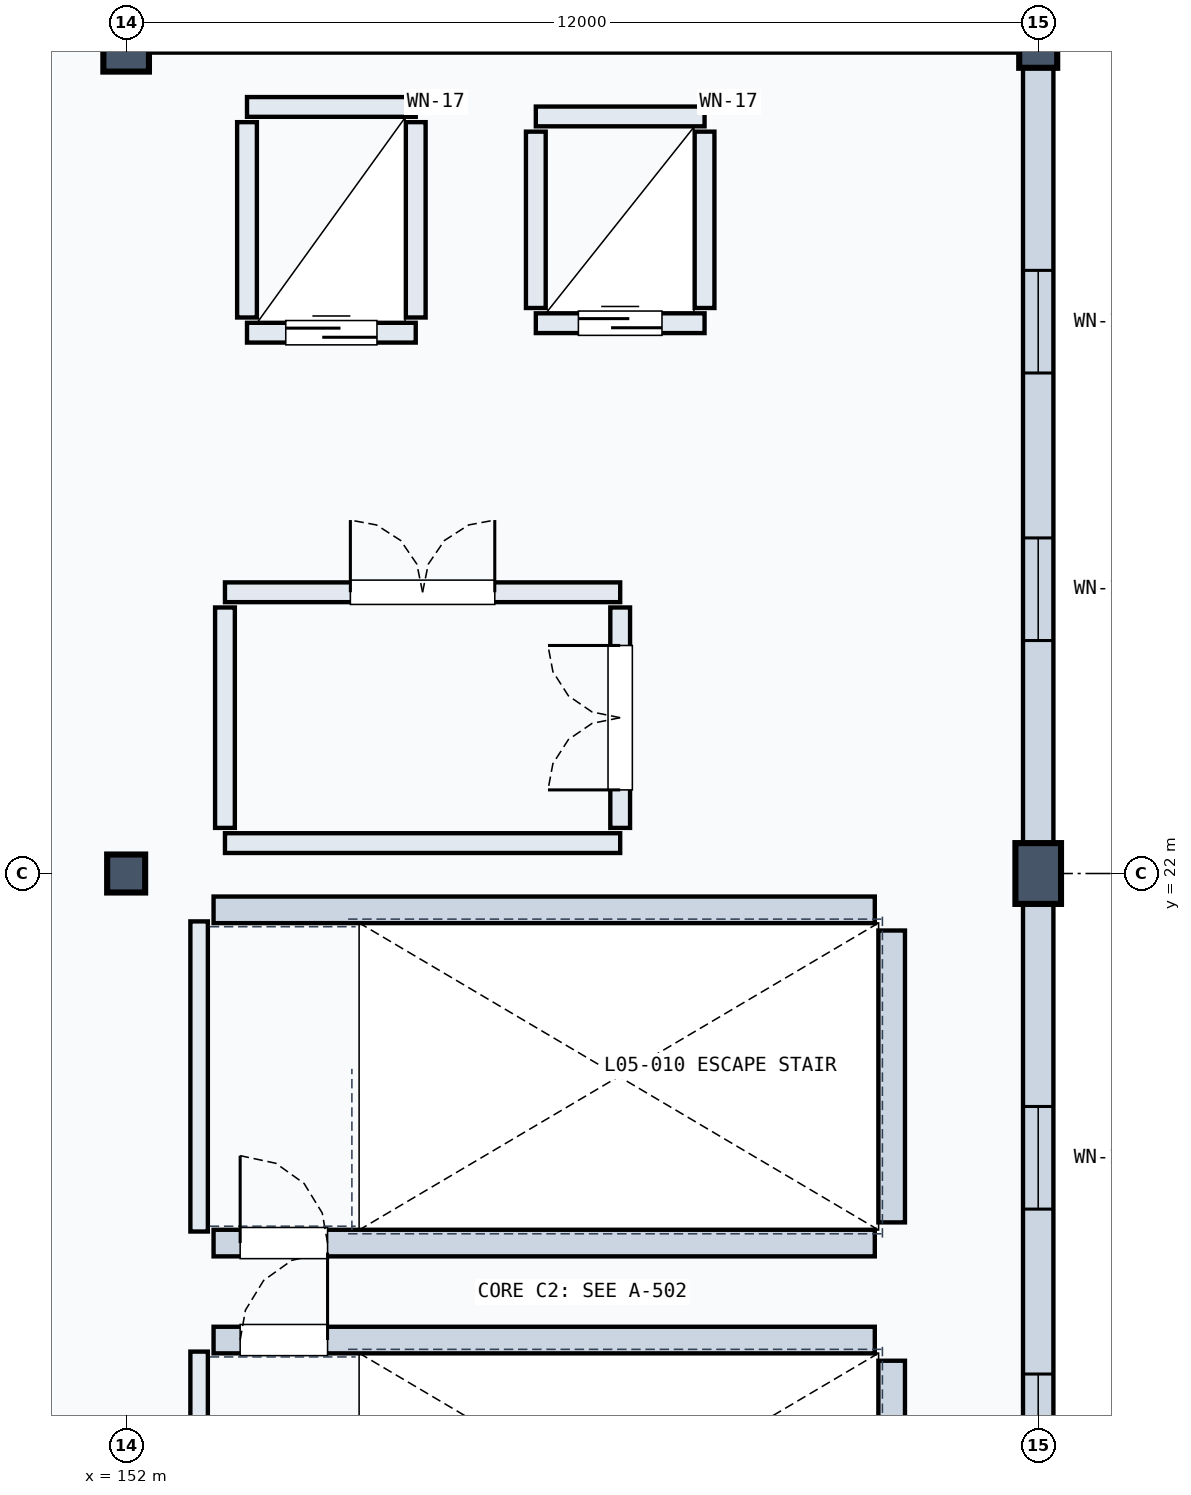
"""IFC4 building model, lengths in metres.
Left out: names, types, materials, properties, quantities, classifications, styles, units other than length and angle.
Written with IfcOpenShell. Run it as: python <this file> out.ifc"""

import sys

from ifc_helpers import new_model, si_unit, direction, frame, frame_2d, origin, origin_2d, place, context, subcontext, project, spatial, rectangle, extrude, element, fill, save


model = new_model("IFC4")
c1 = context("Model", 3, precision=1e-05, world=origin(), true_north=direction((0.0, 1.0)))
c2 = subcontext(c1, "Body", "Model", "MODEL_VIEW")
j1 = project(units=[si_unit("LENGTHUNIT", "METRE"), si_unit("PLANEANGLEUNIT", "RADIAN")], contexts=[c1])
p1 = place(None, origin())
s1 = spatial("IfcSite", under=j1, at=p1, CompositionType="ELEMENT")
p2 = place(p1, origin())
s2 = spatial("IfcBuilding", under=s1, at=p2, CompositionType="ELEMENT")
p3 = place(p2, frame((0.0, 0.0, 24.3)))
s3 = spatial("IfcBuildingStorey", under=s2, at=p3, CompositionType="ELEMENT", Elevation=24.3)
p4 = place(p3, frame((152.0, 22.0, 0.0), z_axis=(0.0, 0.0, 1.0), x_axis=(1.0, 0.0, 0.0)))
e1 = element("IfcColumn", 1, at=p4, inside=s3, PredefinedType="COLUMN", context=c2, shape_type="SweptSolid", body=[
    extrude(rectangle(XDim=0.5, YDim=0.5, at=origin_2d()), origin(), (0.0, 0.0, 1.0), 5.4),
])
p5 = place(p3, frame((152.0, 33.0, 0.0), z_axis=(0.0, 0.0, 1.0), x_axis=(1.0, 0.0, 0.0)))
e2 = element("IfcColumn", 2, at=p5, inside=s3, PredefinedType="COLUMN", context=c2, shape_type="SweptSolid", body=[
    extrude(rectangle(XDim=0.6, YDim=0.9, at=origin_2d()), origin(), (0.0, 0.0, 1.0), 5.4),
])
p6 = place(p3, frame((164.0, 22.0, 0.0), z_axis=(0.0, 0.0, 1.0), x_axis=(1.0, 0.0, 0.0)))
e3 = element("IfcColumn", 3, at=p6, inside=s3, PredefinedType="COLUMN", context=c2, shape_type="SweptSolid", body=[
    extrude(rectangle(XDim=0.6, YDim=0.8, at=origin_2d()), origin(), (0.0, 0.0, 1.0), 5.4),
])
p7 = place(p3, frame((164.0, 33.0, 0.0), z_axis=(0.0, 0.0, 1.0), x_axis=(1.0, 0.0, 0.0)))
e4 = element("IfcColumn", 4, at=p7, inside=s3, PredefinedType="COLUMN", context=c2, shape_type="SweptSolid", body=[
    extrude(rectangle(XDim=0.5, YDim=0.8, at=origin_2d()), origin(), (0.0, 0.0, 1.0), 5.4),
])
p8 = place(p3, frame((164.0, 11.22, 0.0), z_axis=(0.0, 0.0, 1.0), x_axis=(0.0, 1.0, 0.0)))
e5 = element("IfcWall", 5, at=p8, inside=s3, PredefinedType="SOLIDWALL", context=c2, shape_type="SweptSolid", body=[
    extrude(rectangle(XDim=10.56, YDim=0.4, at=frame_2d((5.28, 0.0))), origin(), (0.0, 0.0, 1.0), 5.185),
])
p9 = place(p8, frame((2.845, 0.0, 0.8)))
e6 = element("IfcOpeningElement", 6, at=p9, cuts=e5, PredefinedType="OPENING", context=c2, shape_type="SweptSolid", body=[
    extrude(rectangle(XDim=1.35, YDim=2.1, at=frame_2d((0.675, 1.05))), frame((0.0, 0.21, 0.0), z_axis=(0.0, -1.0, 0.0), x_axis=(1.0, 0.0, 0.0)), (0.0, 0.0, 1.0), 0.42),
])
p10 = place(p8, frame((6.365, 0.0, 0.8)))
e7 = element("IfcOpeningElement", 7, at=p10, cuts=e5, PredefinedType="OPENING", context=c2, shape_type="SweptSolid", body=[
    extrude(rectangle(XDim=1.35, YDim=2.1, at=frame_2d((0.675, 1.05))), frame((0.0, 0.21, 0.0), z_axis=(0.0, -1.0, 0.0), x_axis=(1.0, 0.0, 0.0)), (0.0, 0.0, 1.0), 0.42),
])
p11 = place(p3, frame((152.22, 33.0, 0.0), z_axis=(0.0, 0.0, 1.0), x_axis=(1.0, 0.0, 0.0)))
e8 = element("IfcWall", 8, at=p11, inside=s3, PredefinedType="SOLIDWALL", context=c2, shape_type="SweptSolid", body=[
    extrude(rectangle(XDim=11.56, YDim=0.4, at=frame_2d((5.78, 0.0))), origin(), (0.0, 0.0, 1.0), 5.185),
])
p12 = place(p11, frame((3.178, 0.0, 0.8)))
e9 = element("IfcOpeningElement", 9, at=p12, cuts=e8, PredefinedType="OPENING", context=c2, shape_type="SweptSolid", body=[
    extrude(rectangle(XDim=1.35, YDim=2.1, at=frame_2d((0.675, 1.05))), frame((0.0, 0.21, 0.0), z_axis=(0.0, -1.0, 0.0), x_axis=(1.0, 0.0, 0.0)), (0.0, 0.0, 1.0), 0.42),
])
p13 = place(p11, frame((7.032, 0.0, 0.8)))
e10 = element("IfcOpeningElement", 10, at=p13, cuts=e8, PredefinedType="OPENING", context=c2, shape_type="SweptSolid", body=[
    extrude(rectangle(XDim=1.35, YDim=2.1, at=frame_2d((0.675, 1.05))), frame((0.0, 0.21, 0.0), z_axis=(0.0, -1.0, 0.0), x_axis=(1.0, 0.0, 0.0)), (0.0, 0.0, 1.0), 0.42),
])
p14 = place(p3, frame((164.0, 22.22, 0.0), z_axis=(0.0, 0.0, 1.0), x_axis=(0.0, 1.0, 0.0)))
e11 = element("IfcWall", 11, at=p14, inside=s3, PredefinedType="SOLIDWALL", context=c2, shape_type="SweptSolid", body=[
    extrude(rectangle(XDim=10.56, YDim=0.4, at=frame_2d((5.28, 0.0))), origin(), (0.0, 0.0, 1.0), 5.185),
])
p15 = place(p14, frame((2.845, 0.0, 0.8)))
e12 = element("IfcOpeningElement", 12, at=p15, cuts=e11, PredefinedType="OPENING", context=c2, shape_type="SweptSolid", body=[
    extrude(rectangle(XDim=1.35, YDim=2.1, at=frame_2d((0.675, 1.05))), frame((0.0, 0.21, 0.0), z_axis=(0.0, -1.0, 0.0), x_axis=(1.0, 0.0, 0.0)), (0.0, 0.0, 1.0), 0.42),
])
p16 = place(p14, frame((6.365, 0.0, 0.8)))
e13 = element("IfcOpeningElement", 13, at=p16, cuts=e11, PredefinedType="OPENING", context=c2, shape_type="SweptSolid", body=[
    extrude(rectangle(XDim=1.35, YDim=2.1, at=frame_2d((0.675, 1.05))), frame((0.0, 0.21, 0.0), z_axis=(0.0, -1.0, 0.0), x_axis=(1.0, 0.0, 0.0)), (0.0, 0.0, 1.0), 0.42),
])
p17 = place(p3, frame((152.96, 11.63, 0.0), z_axis=(0.0, 0.0, 1.0), x_axis=(0.0, 1.0, 0.0)))
e14 = element("IfcWall", 14, at=p17, inside=s3, PredefinedType="SOLIDWALL", context=c2, shape_type="SweptSolid", body=[
    extrude(rectangle(XDim=4.08, YDim=0.23, at=frame_2d((2.04, 0.0))), origin(), (0.0, 0.0, 1.0), 5.18),
])
p18 = place(p3, frame((162.072, 11.05, 0.0), z_axis=(0.0, 0.0, 1.0), x_axis=(0.0, 1.0, 0.0)))
e15 = element("IfcWall", 15, at=p18, inside=s3, PredefinedType="SOLIDWALL", context=c2, shape_type="SweptSolid", body=[
    extrude(rectangle(XDim=4.54, YDim=0.35, at=frame_2d((2.27, 0.0))), origin(), (0.0, 0.0, 1.0), 5.18),
])
p19 = place(p3, frame((153.15, 15.862, 0.0), z_axis=(0.0, 0.0, 1.0), x_axis=(1.0, 0.0, 0.0)))
e16 = element("IfcWall", 16, at=p19, inside=s3, PredefinedType="SOLIDWALL", context=c2, shape_type="SweptSolid", body=[
    extrude(rectangle(XDim=8.7, YDim=0.35, at=frame_2d((4.35, 0.0))), origin(), (0.0, 0.0, 1.0), 5.18),
])
p20 = place(p19, frame((0.35, 0.0, 0.0)))
e17 = element("IfcOpeningElement", 17, at=p20, cuts=e16, PredefinedType="OPENING", context=c2, shape_type="SweptSolid", body=[
    extrude(rectangle(XDim=1.15, YDim=2.2, at=frame_2d((0.575, 1.1))), frame((0.0, 0.185, 0.0), z_axis=(0.0, -1.0, 0.0), x_axis=(1.0, 0.0, 0.0)), (0.0, 0.0, 1.0), 0.37),
])
p21 = place(p3, frame((152.96, 17.29, 0.0), z_axis=(0.0, 0.0, 1.0), x_axis=(0.0, 1.0, 0.0)))
e18 = element("IfcWall", 18, at=p21, inside=s3, PredefinedType="SOLIDWALL", context=c2, shape_type="SweptSolid", body=[
    extrude(rectangle(XDim=4.08, YDim=0.23, at=frame_2d((2.04, 0.0))), origin(), (0.0, 0.0, 1.0), 5.18),
])
p22 = place(p3, frame((162.072, 17.41, 0.0), z_axis=(0.0, 0.0, 1.0), x_axis=(0.0, 1.0, 0.0)))
e19 = element("IfcWall", 19, at=p22, inside=s3, PredefinedType="SOLIDWALL", context=c2, shape_type="SweptSolid", body=[
    extrude(rectangle(XDim=3.84, YDim=0.35, at=frame_2d((1.92, 0.0))), origin(), (0.0, 0.0, 1.0), 5.18),
])
p23 = place(p3, frame((153.15, 17.138, 0.0), z_axis=(0.0, 0.0, 1.0), x_axis=(1.0, 0.0, 0.0)))
e20 = element("IfcWall", 20, at=p23, inside=s3, PredefinedType="SOLIDWALL", context=c2, shape_type="SweptSolid", body=[
    extrude(rectangle(XDim=8.7, YDim=0.35, at=frame_2d((4.35, 0.0))), origin(), (0.0, 0.0, 1.0), 5.18),
])
p24 = place(p23, frame((0.35, 0.0, 0.0)))
e21 = element("IfcOpeningElement", 21, at=p24, cuts=e20, PredefinedType="OPENING", context=c2, shape_type="SweptSolid", body=[
    extrude(rectangle(XDim=1.15, YDim=2.2, at=frame_2d((0.575, 1.1))), frame((0.0, 0.185, 0.0), z_axis=(0.0, -1.0, 0.0), x_axis=(1.0, 0.0, 0.0)), (0.0, 0.0, 1.0), 0.37),
])
p25 = place(p3, frame((153.15, 21.522, 0.0), z_axis=(0.0, 0.0, 1.0), x_axis=(1.0, 0.0, 0.0)))
e22 = element("IfcWall", 22, at=p25, inside=s3, PredefinedType="SOLIDWALL", context=c2, shape_type="SweptSolid", body=[
    extrude(rectangle(XDim=8.7, YDim=0.35, at=frame_2d((4.35, 0.0))), origin(), (0.0, 0.0, 1.0), 5.18),
])
p26 = place(p3, frame((153.59, 29.115, 0.0), z_axis=(0.0, 0.0, 1.0), x_axis=(1.0, 0.0, 0.0)))
e23 = element("IfcWall", 23, at=p26, inside=s3, PredefinedType="SOLIDWALL", context=c2, shape_type="SweptSolid", body=[
    extrude(rectangle(XDim=2.22, YDim=0.26, at=frame_2d((1.11, 0.0))), origin(), (0.0, 0.0, 1.0), 5.18),
])
p27 = place(p26, frame((0.51, 0.0, 0.0)))
e24 = element("IfcOpeningElement", 24, at=p27, cuts=e23, PredefinedType="OPENING", context=c2, shape_type="SweptSolid", body=[
    extrude(rectangle(XDim=1.2, YDim=2.2, at=frame_2d((0.6, 1.1))), frame((0.0, 0.14, 0.0), z_axis=(0.0, -1.0, 0.0), x_axis=(1.0, 0.0, 0.0)), (0.0, 0.0, 1.0), 0.28),
])
p28 = place(p3, frame((153.59, 32.085, 0.0), z_axis=(0.0, 0.0, 1.0), x_axis=(1.0, 0.0, 0.0)))
e25 = element("IfcWall", 25, at=p28, inside=s3, PredefinedType="SOLIDWALL", context=c2, shape_type="SweptSolid", body=[
    extrude(rectangle(XDim=2.22, YDim=0.26, at=frame_2d((1.11, 0.0))), origin(), (0.0, 0.0, 1.0), 5.18),
])
for number, where, z_axis, x_axis in (
    (26, (153.59, 29.315, 0.0), (0.0, 0.0, 1.0), (0.0, 1.0, 0.0)),
    (27, (155.81, 29.315, 0.0), (0.0, 0.0, 1.0), (0.0, 1.0, 0.0)),
):
    element("IfcWall", number, at=place(p3, frame(where, z_axis=z_axis, x_axis=x_axis)), inside=s3, PredefinedType="SOLIDWALL", context=c2, shape_type="SweptSolid", body=[
        extrude(rectangle(XDim=2.57, YDim=0.26, at=frame_2d((1.285, 0.0))), origin(), (0.0, 0.0, 1.0), 5.18),
    ])
p29 = place(p3, frame((157.39, 29.24, 0.0), z_axis=(0.0, 0.0, 1.0), x_axis=(1.0, 0.0, 0.0)))
e28 = element("IfcWall", 28, at=p29, inside=s3, PredefinedType="SOLIDWALL", context=c2, shape_type="SweptSolid", body=[
    extrude(rectangle(XDim=2.22, YDim=0.26, at=frame_2d((1.11, 0.0))), origin(), (0.0, 0.0, 1.0), 5.18),
])
p30 = place(p29, frame((0.56, 0.0, 0.0)))
e29 = element("IfcOpeningElement", 29, at=p30, cuts=e28, PredefinedType="OPENING", context=c2, shape_type="SweptSolid", body=[
    extrude(rectangle(XDim=1.1, YDim=2.15, at=frame_2d((0.55, 1.075))), frame((0.0, 0.14, 0.0), z_axis=(0.0, -1.0, 0.0), x_axis=(1.0, 0.0, 0.0)), (0.0, 0.0, 1.0), 0.28),
])
p31 = place(p3, frame((157.39, 31.96, 0.0), z_axis=(0.0, 0.0, 1.0), x_axis=(1.0, 0.0, 0.0)))
e30 = element("IfcWall", 30, at=p31, inside=s3, PredefinedType="SOLIDWALL", context=c2, shape_type="SweptSolid", body=[
    extrude(rectangle(XDim=2.22, YDim=0.26, at=frame_2d((1.11, 0.0))), origin(), (0.0, 0.0, 1.0), 5.18),
])
for number, where, z_axis, x_axis in (
    (31, (157.39, 29.44, 0.0), (0.0, 0.0, 1.0), (0.0, 1.0, 0.0)),
    (32, (159.61, 29.44, 0.0), (0.0, 0.0, 1.0), (0.0, 1.0, 0.0)),
):
    element("IfcWall", number, at=place(p3, frame(where, z_axis=z_axis, x_axis=x_axis)), inside=s3, PredefinedType="SOLIDWALL", context=c2, shape_type="SweptSolid", body=[
        extrude(rectangle(XDim=2.32, YDim=0.26, at=frame_2d((1.16, 0.0))), origin(), (0.0, 0.0, 1.0), 5.18),
    ])
p32 = place(p3, frame((153.3, 25.7, 0.0), z_axis=(0.0, 0.0, 1.0), x_axis=(1.0, 0.0, 0.0)))
e33 = element("IfcWall", 33, at=p32, inside=s3, PredefinedType="SOLIDWALL", context=c2, shape_type="SweptSolid", body=[
    extrude(rectangle(XDim=5.2, YDim=0.26, at=frame_2d((2.6, 0.0))), origin(), (0.0, 0.0, 1.0), 5.18),
])
p33 = place(p32, frame((1.65, 0.0, 0.0)))
e34 = element("IfcOpeningElement", 34, at=p33, cuts=e33, PredefinedType="OPENING", context=c2, shape_type="SweptSolid", body=[
    extrude(rectangle(XDim=1.9, YDim=2.2, at=frame_2d((0.95, 1.1))), frame((0.0, 0.14, 0.0), z_axis=(0.0, -1.0, 0.0), x_axis=(1.0, 0.0, 0.0)), (0.0, 0.0, 1.0), 0.28),
])
p34 = place(p3, frame((153.3, 22.4, 0.0), z_axis=(0.0, 0.0, 1.0), x_axis=(1.0, 0.0, 0.0)))
e35 = element("IfcWall", 35, at=p34, inside=s3, PredefinedType="SOLIDWALL", context=c2, shape_type="SweptSolid", body=[
    extrude(rectangle(XDim=5.2, YDim=0.26, at=frame_2d((2.6, 0.0))), origin(), (0.0, 0.0, 1.0), 5.18),
])
p35 = place(p3, frame((153.3, 22.6, 0.0), z_axis=(0.0, 0.0, 1.0), x_axis=(0.0, 1.0, 0.0)))
e36 = element("IfcWall", 36, at=p35, inside=s3, PredefinedType="SOLIDWALL", context=c2, shape_type="SweptSolid", body=[
    extrude(rectangle(XDim=2.9, YDim=0.26, at=frame_2d((1.45, 0.0))), origin(), (0.0, 0.0, 1.0), 5.18),
])
p36 = place(p3, frame((158.5, 22.6, 0.0), z_axis=(0.0, 0.0, 1.0), x_axis=(0.0, 1.0, 0.0)))
e37 = element("IfcWall", 37, at=p36, inside=s3, PredefinedType="SOLIDWALL", context=c2, shape_type="SweptSolid", body=[
    extrude(rectangle(XDim=2.9, YDim=0.26, at=frame_2d((1.45, 0.0))), origin(), (0.0, 0.0, 1.0), 5.18),
])
p37 = place(p36, frame((0.5, 0.0, 0.0)))
e38 = element("IfcOpeningElement", 38, at=p37, cuts=e37, PredefinedType="OPENING", context=c2, shape_type="SweptSolid", body=[
    extrude(rectangle(XDim=1.9, YDim=2.2, at=frame_2d((0.95, 1.1))), frame((0.0, 0.14, 0.0), z_axis=(0.0, -1.0, 0.0), x_axis=(1.0, 0.0, 0.0)), (0.0, 0.0, 1.0), 0.28),
])
p38 = place(p9, origin())
e39 = element("IfcWindow", 39, at=p38, inside=s3, PartitioningType="SINGLE_PANEL", PredefinedType="WINDOW", context=c2, shape_type="SweptSolid", body=[
    extrude(rectangle(XDim=1.35, YDim=2.1, at=frame_2d((0.675, 1.05))), frame((0.0, 0.03, 0.0), z_axis=(0.0, -1.0, 0.0), x_axis=(1.0, 0.0, 0.0)), (0.0, 0.0, 1.0), 0.06),
])
fill(e6, e39)
p39 = place(p10, origin())
e40 = element("IfcWindow", 40, at=p39, inside=s3, PartitioningType="SINGLE_PANEL", PredefinedType="WINDOW", context=c2, shape_type="SweptSolid", body=[
    extrude(rectangle(XDim=1.35, YDim=2.1, at=frame_2d((0.675, 1.05))), frame((0.0, 0.03, 0.0), z_axis=(0.0, -1.0, 0.0), x_axis=(1.0, 0.0, 0.0)), (0.0, 0.0, 1.0), 0.06),
])
fill(e7, e40)
p40 = place(p15, origin())
e41 = element("IfcWindow", 41, at=p40, inside=s3, PartitioningType="SINGLE_PANEL", PredefinedType="WINDOW", context=c2, shape_type="SweptSolid", body=[
    extrude(rectangle(XDim=1.35, YDim=2.1, at=frame_2d((0.675, 1.05))), frame((0.0, 0.03, 0.0), z_axis=(0.0, -1.0, 0.0), x_axis=(1.0, 0.0, 0.0)), (0.0, 0.0, 1.0), 0.06),
])
fill(e12, e41)
p41 = place(p16, origin())
e42 = element("IfcWindow", 42, at=p41, inside=s3, PartitioningType="SINGLE_PANEL", PredefinedType="WINDOW", context=c2, shape_type="SweptSolid", body=[
    extrude(rectangle(XDim=1.35, YDim=2.1, at=frame_2d((0.675, 1.05))), frame((0.0, 0.03, 0.0), z_axis=(0.0, -1.0, 0.0), x_axis=(1.0, 0.0, 0.0)), (0.0, 0.0, 1.0), 0.06),
])
fill(e13, e42)
p42 = place(p20, origin())
e43 = element("IfcDoor", 43, at=p42, inside=s3, OperationType="SINGLE_SWING_RIGHT", PredefinedType="DOOR", context=c2, shape_type="SweptSolid", body=[
    extrude(rectangle(XDim=1.15, YDim=2.2, at=frame_2d((0.575, 1.1))), frame((0.0, 0.025, 0.0), z_axis=(0.0, -1.0, 0.0), x_axis=(1.0, 0.0, 0.0)), (0.0, 0.0, 1.0), 0.05),
])
fill(e17, e43)
p43 = place(p24, origin())
e44 = element("IfcDoor", 44, at=p43, inside=s3, OperationType="SINGLE_SWING_LEFT", PredefinedType="DOOR", context=c2, shape_type="SweptSolid", body=[
    extrude(rectangle(XDim=1.15, YDim=2.2, at=frame_2d((0.575, 1.1))), frame((0.0, 0.025, 0.0), z_axis=(0.0, -1.0, 0.0), x_axis=(1.0, 0.0, 0.0)), (0.0, 0.0, 1.0), 0.05),
])
fill(e21, e44)
p44 = place(p27, origin())
e45 = element("IfcDoor", 45, at=p44, inside=s3, OperationType="SLIDING_TO_LEFT", PredefinedType="DOOR", context=c2, shape_type="SweptSolid", body=[
    extrude(rectangle(XDim=1.2, YDim=2.2, at=frame_2d((0.6, 1.1))), frame((0.0, 0.025, 0.0), z_axis=(0.0, -1.0, 0.0), x_axis=(1.0, 0.0, 0.0)), (0.0, 0.0, 1.0), 0.05),
])
fill(e24, e45)
p45 = place(p30, origin())
e46 = element("IfcDoor", 46, at=p45, inside=s3, OperationType="SLIDING_TO_LEFT", PredefinedType="DOOR", context=c2, shape_type="SweptSolid", body=[
    extrude(rectangle(XDim=1.1, YDim=2.15, at=frame_2d((0.55, 1.075))), frame((0.0, 0.025, 0.0), z_axis=(0.0, -1.0, 0.0), x_axis=(1.0, 0.0, 0.0)), (0.0, 0.0, 1.0), 0.05),
])
fill(e29, e46)
p46 = place(p33, origin())
e47 = element("IfcDoor", 47, at=p46, inside=s3, OperationType="DOUBLE_DOOR_SINGLE_SWING", PredefinedType="DOOR", context=c2, shape_type="SweptSolid", body=[
    extrude(rectangle(XDim=1.9, YDim=2.2, at=frame_2d((0.95, 1.1))), frame((0.0, 0.025, 0.0), z_axis=(0.0, -1.0, 0.0), x_axis=(1.0, 0.0, 0.0)), (0.0, 0.0, 1.0), 0.05),
])
fill(e34, e47)
p47 = place(p37, origin())
e48 = element("IfcDoor", 48, at=p47, inside=s3, OperationType="DOUBLE_DOOR_SINGLE_SWING", PredefinedType="DOOR", context=c2, shape_type="SweptSolid", body=[
    extrude(rectangle(XDim=1.9, YDim=2.2, at=frame_2d((0.95, 1.1))), frame((0.0, 0.025, 0.0), z_axis=(0.0, -1.0, 0.0), x_axis=(1.0, 0.0, 0.0)), (0.0, 0.0, 1.0), 0.05),
])
fill(e38, e48)
save(model, sys.argv[1])
